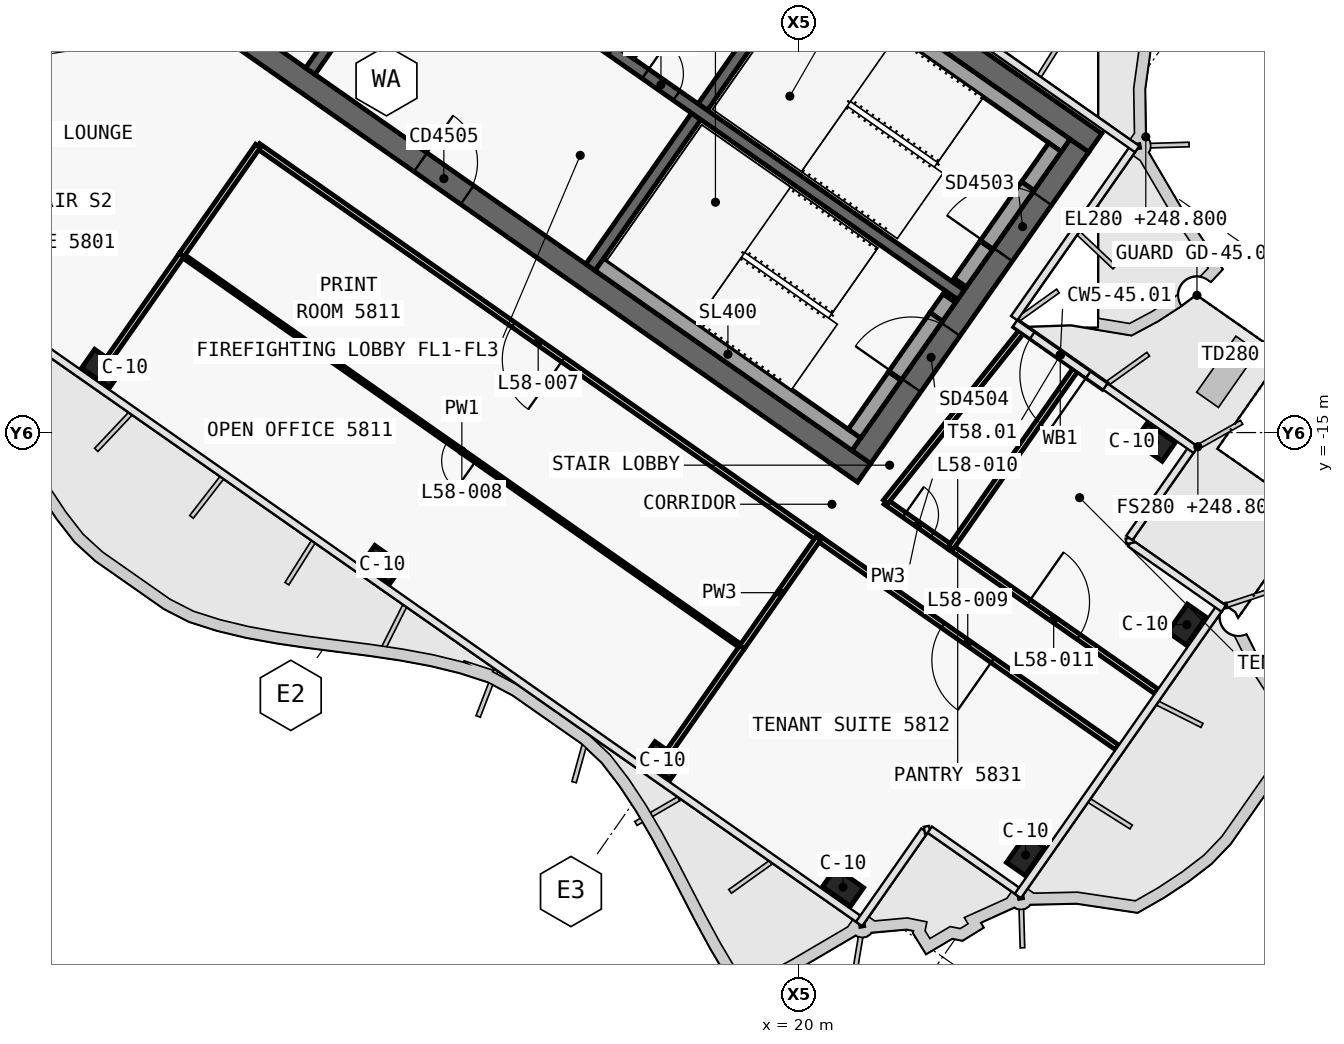
"""IFC4 building model, lengths in metres.
Left out: names, types, materials, properties, quantities, classifications, styles, units other than length and angle.
Written with IfcOpenShell. Run it as: python <this file> out.ifc"""

import sys

from ifc_helpers import new_model, si_unit, direction, frame, frame_2d, origin, origin_2d, place, context, subcontext, project, spatial, polyline, rectangle, outline, extrude, element, fill, save


model = new_model("IFC4")
c1 = context("Model", 3, precision=1e-05, world=origin(), true_north=direction((0.0, 1.0)))
c2 = subcontext(c1, "Body", "Model", "MODEL_VIEW")
j1 = project(units=[si_unit("LENGTHUNIT", "METRE"), si_unit("PLANEANGLEUNIT", "RADIAN")], contexts=[c1])
p1 = place(None, origin())
s1 = spatial("IfcSite", under=j1, at=p1, CompositionType="ELEMENT")
p2 = place(p1, origin())
s2 = spatial("IfcBuilding", under=s1, at=p2, CompositionType="ELEMENT")
p3 = place(p2, frame((0.0, 0.0, 248.8)))
s3 = spatial("IfcBuildingStorey", under=s2, at=p3, CompositionType="ELEMENT", Elevation=248.8)
p4 = place(p3, frame((0.028, 12.066, 0.0), z_axis=(0.0, 0.0, 1.0), x_axis=(0.819151382952, -0.573577380837, 0.0)))
e1 = element("IfcWall", 1, at=p4, inside=s3, PredefinedType="SHEAR", context=c2, shape_type="SweptSolid", body=[
    extrude(outline(polyline([(33.898, 0.3), (0.0, 0.3), (0.42, -0.3), (33.898, -0.3), (33.898, 0.3)])), origin(), (0.0, 0.0, 1.0), 3.9),
])
p5 = place(p3, frame((0.028, -0.874, 0.0), z_axis=(0.0, 0.0, 1.0), x_axis=(0.819150035022, -0.573579305871, 0.0)))
e2 = element("IfcWall", 2, at=p5, inside=s3, PredefinedType="SHEAR", context=c2, shape_type="SweptSolid", body=[
    extrude(outline(polyline([(26.476, 0.3), (0.0, 0.3), (0.42, -0.3), (26.476, -0.3), (26.476, 0.3)])), origin(), (0.0, 0.0, 1.0), 3.9),
])
p6 = place(p5, frame((1.026, 0.0, 0.0)))
e3 = element("IfcOpeningElement", 3, at=p6, cuts=e2, PredefinedType="OPENING", context=c2, shape_type="SweptSolid", body=[
    extrude(rectangle(XDim=1.5, YDim=2.1, at=frame_2d((0.75, 1.05))), frame((0.0, 0.31, 0.0), z_axis=(0.0, -1.0, 0.0), x_axis=(1.0, 0.0, 0.0)), (0.0, 0.0, 1.0), 0.62),
])
p7 = place(p5, frame((12.226, 0.0, 0.0)))
e4 = element("IfcOpeningElement", 4, at=p7, cuts=e2, PredefinedType="OPENING", context=c2, shape_type="SweptSolid", body=[
    extrude(rectangle(XDim=1.5, YDim=2.1, at=frame_2d((0.75, 1.05))), frame((0.0, 0.31, 0.0), z_axis=(0.0, -1.0, 0.0), x_axis=(1.0, 0.0, 0.0)), (0.0, 0.0, 1.0), 0.62),
])
p8 = place(p3, frame((21.642, -15.642, 0.0), z_axis=(0.0, 0.0, 1.0), x_axis=(0.573586866468, 0.819144740944, 0.0)))
e5 = element("IfcWall", 5, at=p8, inside=s3, PredefinedType="SHEAR", context=c2, shape_type="SweptSolid", body=[
    extrude(outline(polyline([(10.0, 0.3), (0.0, 0.3), (0.0, -0.3), (10.0, -0.3), (10.0, 0.3)])), origin(), (0.0, 0.0, 1.0), 3.9),
])
p9 = place(p8, frame((6.5, 0.0, 0.0)))
e6 = element("IfcOpeningElement", 6, at=p9, cuts=e5, PredefinedType="OPENING", context=c2, shape_type="SweptSolid", body=[
    extrude(rectangle(XDim=1.8, YDim=2.1, at=frame_2d((0.9, 1.05))), frame((0.0, 0.31, 0.0), z_axis=(0.0, -1.0, 0.0), x_axis=(1.0, 0.0, 0.0)), (0.0, 0.0, 1.0), 0.62),
])
p10 = place(p8, frame((2.3, 0.0, 0.0)))
e7 = element("IfcOpeningElement", 7, at=p10, cuts=e5, PredefinedType="OPENING", context=c2, shape_type="SweptSolid", body=[
    extrude(rectangle(XDim=1.8, YDim=2.1, at=frame_2d((0.9, 1.05))), frame((0.0, 0.31, 0.0), z_axis=(0.0, -1.0, 0.0), x_axis=(1.0, 0.0, 0.0)), (0.0, 0.0, 1.0), 0.62),
])
p11 = place(p3, frame((7.143, -5.49, 0.0), z_axis=(0.0, 0.0, 1.0), x_axis=(0.573617744349, 0.819123118565, 0.0)))
e8 = element("IfcWall", 8, at=p11, inside=s3, PredefinedType="SHEAR", context=c2, shape_type="SweptSolid", body=[
    extrude(outline(polyline([(0.0, 0.15), (0.0, -0.15), (4.85, -0.15), (4.85, 0.15), (0.0, 0.15)])), origin(), (0.0, 0.0, 1.0), 3.9),
])
p12 = place(p3, frame((14.515, -10.652, 0.0), z_axis=(0.0, 0.0, 1.0), x_axis=(0.573560315113, 0.819163332265, 0.0)))
e9 = element("IfcWall", 9, at=p12, inside=s3, PredefinedType="SHEAR", context=c2, shape_type="SweptSolid", body=[
    extrude(outline(polyline([(0.0, 0.15), (0.0, -0.15), (4.85, -0.15), (4.85, 0.15), (0.0, 0.15)])), origin(), (0.0, 0.0, 1.0), 3.9),
])
p13 = place(p3, frame((17.469, -6.433, 0.0), z_axis=(0.0, 0.0, 1.0), x_axis=(0.573594092424, 0.81913968109, 0.0)))
e10 = element("IfcWall", 10, at=p13, inside=s3, PredefinedType="SHEAR", context=c2, shape_type="SweptSolid", body=[
    extrude(outline(polyline([(4.85, -0.15), (4.85, 0.15), (0.0, 0.15), (0.0, -0.15), (4.85, -0.15)])), origin(), (0.0, 0.0, 1.0), 3.9),
])
p14 = place(p3, frame((2.638, 3.768, 0.0), z_axis=(0.0, 0.0, 1.0), x_axis=(0.819155014212, -0.573572194837, 0.0)))
e11 = element("IfcWall", 11, at=p14, inside=s3, PredefinedType="SHEAR", context=c2, shape_type="SweptSolid", body=[
    extrude(outline(polyline([(0.0, 0.15), (0.0, -0.15), (26.4, -0.15), (26.4, 0.15), (0.0, 0.15)])), origin(), (0.0, 0.0, 1.0), 3.9),
])
p15 = place(p14, frame((9.637, 0.0, 0.0)))
e12 = element("IfcOpeningElement", 12, at=p15, cuts=e11, PredefinedType="OPENING", context=c2, shape_type="SweptSolid", body=[
    extrude(rectangle(XDim=1.2, YDim=2.1, at=frame_2d((0.6, 1.05))), frame((0.0, 0.16, 0.0), z_axis=(0.0, -1.0, 0.0), x_axis=(1.0, 0.0, 0.0)), (0.0, 0.0, 1.0), 0.32),
])
p16 = place(p14, frame((11.812, 0.0, 0.0)))
e13 = element("IfcOpeningElement", 13, at=p16, cuts=e11, PredefinedType="OPENING", context=c2, shape_type="SweptSolid", body=[
    extrude(rectangle(XDim=1.2, YDim=2.1, at=frame_2d((0.6, 1.05))), frame((0.0, 0.16, 0.0), z_axis=(0.0, -1.0, 0.0), x_axis=(1.0, 0.0, 0.0)), (0.0, 0.0, 1.0), 0.32),
])
p17 = place(p14, frame((13.988, 0.0, 0.0)))
e14 = element("IfcOpeningElement", 14, at=p17, cuts=e11, PredefinedType="OPENING", context=c2, shape_type="SweptSolid", body=[
    extrude(rectangle(XDim=1.2, YDim=2.1, at=frame_2d((0.6, 1.05))), frame((0.0, 0.16, 0.0), z_axis=(0.0, -1.0, 0.0), x_axis=(1.0, 0.0, 0.0)), (0.0, 0.0, 1.0), 0.32),
])
p18 = place(p14, frame((16.262, 0.0, 0.0)))
e15 = element("IfcOpeningElement", 15, at=p18, cuts=e11, PredefinedType="OPENING", context=c2, shape_type="SweptSolid", body=[
    extrude(rectangle(XDim=1.0, YDim=2.1, at=frame_2d((0.5, 1.05))), frame((0.0, 0.16, 0.0), z_axis=(0.0, -1.0, 0.0), x_axis=(1.0, 0.0, 0.0)), (0.0, 0.0, 1.0), 0.32),
])
for number, where, z_axis, x_axis in (
    (16, (1.665, -13.313, 0.0), (0.0, 0.0, 1.0), (0.819, -0.574, 0.0)),
    (17, (9.038, -18.475, 0.0), (0.0, 0.0, 1.0), (0.819, -0.574, 0.0)),
    (18, (16.41, -23.637, 0.0), (0.0, 0.0, 1.0), (0.819, -0.574, 0.0)),
    (19, (21.161, -26.964, 0.0), (0.0, 0.0, 1.0), (0.819, -0.574, 0.0)),
    (20, (29.363, -15.25, 0.0), (0.0, 0.0, 1.0), (0.819, -0.574, 0.0)),
    (21, (25.966, -26.117, 0.0), (0.0, 0.0, 1.0), (0.574, 0.819, 0.0)),
    (22, (30.21, -20.055, 0.0), (0.0, 0.0, 1.0), (0.574, 0.819, 0.0)),
):
    element("IfcColumn", number, at=place(p3, frame(where, z_axis=z_axis, x_axis=x_axis)), inside=s3, PredefinedType="COLUMN", context=c2, shape_type="SweptSolid", body=[
        extrude(rectangle(XDim=0.9, YDim=0.6, at=origin_2d()), origin(), (0.0, 0.0, 1.0), 3.9),
    ])
p19 = place(p3, frame((15.565, -5.1, 0.0), z_axis=(0.0, 0.0, 1.0), x_axis=(0.573560315113, 0.819163332265, 0.0)))
e23 = element("IfcWall", 23, at=p19, inside=s3, PredefinedType="SOLIDWALL", context=c2, shape_type="SweptSolid", body=[
    extrude(rectangle(XDim=4.85, YDim=0.2, at=frame_2d((2.425, 0.0))), origin(), (0.0, 0.0, 1.0), 3.9),
])
p20 = place(p3, frame((20.259, -2.71, 0.0), z_axis=(0.0, 0.0, 1.0), x_axis=(0.81914849389, -0.573581506813, 0.0)))
e24 = element("IfcWall", 24, at=p20, inside=s3, PredefinedType="SOLIDWALL", context=c2, shape_type="SweptSolid", body=[
    extrude(rectangle(XDim=8.25, YDim=0.4, at=frame_2d((4.125, 0.0))), origin(), (0.0, 0.0, 1.0), 3.62),
])
p21 = place(p3, frame((24.244, -11.055, 0.0), z_axis=(0.0, 0.0, 1.0), x_axis=(0.573571582932, 0.819155442668, 0.0)))
e25 = element("IfcWall", 25, at=p21, inside=s3, PredefinedType="SOLIDWALL", context=c2, shape_type="SweptSolid", body=[
    extrude(rectangle(XDim=1.2, YDim=0.4, at=frame_2d((0.6, 0.0))), origin(), (0.0, 0.0, 1.0), 3.62),
])
p22 = place(p3, frame((26.022, -8.515, 0.0), z_axis=(0.0, 0.0, 1.0), x_axis=(0.573619628835, 0.819121798889, 0.0)))
e26 = element("IfcWall", 26, at=p22, inside=s3, PredefinedType="SOLIDWALL", context=c2, shape_type="SweptSolid", body=[
    extrude(rectangle(XDim=1.25, YDim=0.4, at=frame_2d((0.625, 0.0))), origin(), (0.0, 0.0, 1.0), 3.62),
])
p23 = place(p3, frame((24.932, -10.072, 2.15), z_axis=(0.0, 0.0, 1.0), x_axis=(0.573591692345, 0.819141361715, 0.0)))
e27 = element("IfcWall", 27, at=p23, inside=s3, PredefinedType="SOLIDWALL", context=c2, shape_type="SweptSolid", body=[
    extrude(rectangle(XDim=1.9, YDim=0.4, at=frame_2d((0.95, 0.0))), origin(), (0.0, 0.0, 1.0), 1.47),
])
p24 = place(p3, frame((14.753, -10.574, 0.0), z_axis=(0.0, 0.0, 1.0), x_axis=(0.819158229677, -0.573567602601, 0.0)))
e28 = element("IfcWall", 28, at=p24, inside=s3, PredefinedType="SOLIDWALL", context=c2, shape_type="SweptSolid", body=[
    extrude(rectangle(XDim=8.25, YDim=0.4, at=frame_2d((4.125, 0.0))), origin(), (0.0, 0.0, 1.0), 3.62),
])
p25 = place(p3, frame((21.462, -15.028, 0.0), z_axis=(0.0, 0.0, 1.0), x_axis=(0.573559770908, 0.819163713305, 0.0)))
e29 = element("IfcWall", 29, at=p25, inside=s3, PredefinedType="SOLIDWALL", context=c2, shape_type="SweptSolid", body=[
    extrude(rectangle(XDim=1.85, YDim=0.4, at=frame_2d((0.925, 0.0))), origin(), (0.0, 0.0, 1.0), 3.62),
])
p26 = place(p3, frame((23.613, -11.956, 0.0), z_axis=(0.0, 0.0, 1.0), x_axis=(0.573435029941, 0.819251039936, 0.0)))
e30 = element("IfcWall", 30, at=p26, inside=s3, PredefinedType="SOLIDWALL", context=c2, shape_type="SweptSolid", body=[
    extrude(rectangle(XDim=0.6, YDim=0.4, at=frame_2d((0.3, 0.0))), origin(), (0.0, 0.0, 1.0), 3.62),
])
p27 = place(p3, frame((22.523, -13.512, 2.15), z_axis=(0.0, 0.0, 1.0), x_axis=(0.573591692345, 0.819141361715, 0.0)))
e31 = element("IfcWall", 31, at=p27, inside=s3, PredefinedType="SOLIDWALL", context=c2, shape_type="SweptSolid", body=[
    extrude(rectangle(XDim=1.9, YDim=0.4, at=frame_2d((0.95, 0.0))), origin(), (0.0, 0.0, 1.0), 1.47),
])
p28 = place(p3, frame((28.04, -13.774, 0.0), z_axis=(0.0, 0.0, 1.0), x_axis=(-0.819134974682, 0.573600813505, 0.0)))
e32 = element("IfcWall", 32, at=p28, inside=s3, PredefinedType="SOLIDWALL", context=c2, shape_type="SweptSolid", body=[
    extrude(rectangle(XDim=2.84, YDim=0.2, at=frame_2d((1.42, 0.0))), origin(), (0.0, 0.0, 1.0), 3.62),
])
p29 = place(p28, frame((0.52, 0.0, 0.0)))
e33 = element("IfcOpeningElement", 33, at=p29, cuts=e32, PredefinedType="OPENING", context=c2, shape_type="SweptSolid", body=[
    extrude(rectangle(XDim=1.8, YDim=2.4, at=frame_2d((0.9, 1.2))), frame((0.0, 0.11, 0.0), z_axis=(0.0, -1.0, 0.0), x_axis=(1.0, 0.0, 0.0)), (0.0, 0.0, 1.0), 0.22),
])
p30 = place(p3, frame((22.281, -16.822, 0.0), z_axis=(0.0, 0.0, 1.0), x_axis=(0.819166447083, -0.573555866479, 0.0)))
e34 = element("IfcWall", 34, at=p30, inside=s3, PredefinedType="PARTITIONING", context=c2, shape_type="SweptSolid", body=[
    extrude(rectangle(XDim=2.102, YDim=0.15, at=frame_2d((1.051, 0.0))), origin(), (0.0, 0.0, 1.0), 3.62),
])
p31 = place(p30, frame((0.601, 0.0, 0.0)))
e35 = element("IfcOpeningElement", 35, at=p31, cuts=e34, PredefinedType="OPENING", context=c2, shape_type="SweptSolid", body=[
    extrude(rectangle(XDim=0.9, YDim=2.1, at=frame_2d((0.45, 1.05))), frame((0.0, 0.085, 0.0), z_axis=(0.0, -1.0, 0.0), x_axis=(1.0, 0.0, 0.0)), (0.0, 0.0, 1.0), 0.17),
])
p32 = place(p3, frame((23.999, -18.025, 0.0), z_axis=(0.0, 0.0, 1.0), x_axis=(0.819169373176, -0.57355168734, 0.0)))
e36 = element("IfcWall", 36, at=p32, inside=s3, PredefinedType="PARTITIONING", context=c2, shape_type="SweptSolid", body=[
    extrude(rectangle(XDim=6.602, YDim=0.15, at=frame_2d((3.301, 0.0))), origin(), (0.0, 0.0, 1.0), 3.0),
])
p33 = place(p32, frame((2.501, 0.0, 0.0)))
e37 = element("IfcOpeningElement", 37, at=p33, cuts=e36, PredefinedType="OPENING", context=c2, shape_type="SweptSolid", body=[
    extrude(rectangle(XDim=1.6, YDim=2.1, at=frame_2d((0.8, 1.05))), frame((0.0, 0.085, 0.0), z_axis=(0.0, -1.0, 0.0), x_axis=(1.0, 0.0, 0.0)), (0.0, 0.0, 1.0), 0.17),
])
p34 = place(p3, frame((20.513, -17.781, 0.0), z_axis=(0.0, 0.0, 1.0), x_axis=(-0.819153544995, 0.573574293115, 0.0)))
e38 = element("IfcWall", 38, at=p34, inside=s3, PredefinedType="PARTITIONING", context=c2, shape_type="SweptSolid", body=[
    extrude(rectangle(XDim=18.002, YDim=0.15, at=frame_2d((9.001, 0.0))), origin(), (0.0, 0.0, 1.0), 3.05),
])
p35 = place(p34, frame((8.201, 0.0, 0.0)))
e39 = element("IfcOpeningElement", 39, at=p35, cuts=e38, PredefinedType="OPENING", context=c2, shape_type="SweptSolid", body=[
    extrude(rectangle(XDim=1.6, YDim=2.1, at=frame_2d((0.8, 1.05))), frame((0.0, 0.085, 0.0), z_axis=(0.0, -1.0, 0.0), x_axis=(1.0, 0.0, 0.0)), (0.0, 0.0, 1.0), 0.17),
])
p36 = place(p3, frame((28.375, -23.287, 0.0), z_axis=(0.0, 0.0, 1.0), x_axis=(-0.819147101588, 0.573583495196, 0.0)))
e40 = element("IfcWall", 40, at=p36, inside=s3, PredefinedType="PARTITIONING", context=c2, shape_type="SweptSolid", body=[
    extrude(rectangle(XDim=9.602, YDim=0.15, at=frame_2d((4.801, 0.0))), origin(), (0.0, 0.0, 1.0), 3.0),
])
p37 = place(p36, frame((4.001, 0.0, 0.0)))
e41 = element("IfcOpeningElement", 41, at=p37, cuts=e40, PredefinedType="OPENING", context=c2, shape_type="SweptSolid", body=[
    extrude(rectangle(XDim=1.6, YDim=2.1, at=frame_2d((0.8, 1.05))), frame((0.0, 0.085, 0.0), z_axis=(0.0, -1.0, 0.0), x_axis=(1.0, 0.0, 0.0)), (0.0, 0.0, 1.0), 0.17),
])
p38 = place(p3, frame((27.269, -13.356, 0.0), z_axis=(0.0, 0.0, 1.0), x_axis=(-0.573309978038, -0.819338555838, 0.0)))
e42 = element("IfcWall", 42, at=p38, inside=s3, PredefinedType="PARTITIONING", context=c2, shape_type="SweptSolid", body=[
    extrude(rectangle(XDim=5.7, YDim=0.15, at=frame_2d((2.85, 0.0))), origin(), (0.0, 0.0, 1.0), 3.05),
])
p39 = place(p3, frame((22.282, -16.823, 0.0), z_axis=(0.0, 0.0, 1.0), x_axis=(0.623563137477, 0.781772993637, 0.0)))
e43 = element("IfcWall", 43, at=p39, inside=s3, PredefinedType="PARTITIONING", context=c2, shape_type="SweptSolid", body=[
    extrude(rectangle(XDim=5.711, YDim=0.15, at=frame_2d((2.855, 0.0))), origin(), (0.0, 0.0, 1.0), 3.05),
])
p40 = place(p3, frame((18.503, -20.648, 0.0), z_axis=(0.0, 0.0, 1.0), x_axis=(-0.819154173185, 0.573573395961, 0.0)))
e44 = element("IfcWall", 44, at=p40, inside=s3, PredefinedType="PARTITIONING", context=c2, shape_type="SweptSolid", body=[
    extrude(rectangle(XDim=18.0, YDim=0.1, at=frame_2d((9.0, 0.0))), origin(), (0.0, 0.0, 1.0), 3.05),
])
p41 = place(p40, frame((8.55, 0.0, 0.0)))
e45 = element("IfcOpeningElement", 45, at=p41, cuts=e44, PredefinedType="OPENING", context=c2, shape_type="SweptSolid", body=[
    extrude(rectangle(XDim=0.9, YDim=2.1, at=frame_2d((0.45, 1.05))), frame((0.0, 0.06, 0.0), z_axis=(0.0, -1.0, 0.0), x_axis=(1.0, 0.0, 0.0)), (0.0, 0.0, 1.0), 0.12),
])
p42 = place(p3, frame((18.503, -20.648, 0.0), z_axis=(0.0, 0.0, 1.0), x_axis=(-0.573560777794, -0.819163008306, 0.0)))
e46 = element("IfcWall", 46, at=p42, inside=s3, PredefinedType="PARTITIONING", context=c2, shape_type="SweptSolid", body=[
    extrude(rectangle(XDim=3.329, YDim=0.15, at=frame_2d((1.665, 0.0))), origin(), (0.0, 0.0, 1.0), 3.05),
])
p43 = place(p3, frame((1.849, -13.051, 0.0), z_axis=(0.0, 0.0, 1.0), x_axis=(0.573595235521, 0.819138880647, 0.0)))
e47 = element("IfcWall", 47, at=p43, inside=s3, PredefinedType="PARTITIONING", context=c2, shape_type="SweptSolid", body=[
    extrude(rectangle(XDim=3.329, YDim=0.15, at=frame_2d((1.665, 0.0))), origin(), (0.0, 0.0, 1.0), 3.05),
])
p44 = place(p3, frame((20.511, -17.78, 0.0), z_axis=(0.0, 0.0, 1.0), x_axis=(-0.573551294295, -0.819169648371, 0.0)))
e48 = element("IfcWall", 48, at=p44, inside=s3, PredefinedType="PARTITIONING", context=c2, shape_type="SweptSolid", body=[
    extrude(rectangle(XDim=3.5, YDim=0.15, at=frame_2d((1.75, 0.0))), origin(), (0.0, 0.0, 1.0), 3.05),
])
p45 = place(p3, frame((3.759, -10.323, 0.0), z_axis=(0.0, 0.0, 1.0), x_axis=(0.573598101901, 0.81913687348, 0.0)))
e49 = element("IfcWall", 49, at=p45, inside=s3, PredefinedType="PARTITIONING", context=c2, shape_type="SweptSolid", body=[
    extrude(rectangle(XDim=3.5, YDim=0.15, at=frame_2d((1.75, 0.0))), origin(), (0.0, 0.0, 1.0), 3.05),
])
p46 = place(p18, origin())
e50 = element("IfcDoor", 50, at=p46, inside=s3, OperationType="SINGLE_SWING_RIGHT", PredefinedType="DOOR", context=c2, shape_type="SweptSolid", body=[
    extrude(rectangle(XDim=1.0, YDim=2.1, at=frame_2d((0.5, 1.05))), frame((0.0, 0.025, 0.0), z_axis=(0.0, -1.0, 0.0), x_axis=(1.0, 0.0, 0.0)), (0.0, 0.0, 1.0), 0.05),
])
fill(e15, e50)
p47 = place(p7, origin())
e51 = element("IfcDoor", 51, at=p47, inside=s3, OperationType="DOUBLE_DOOR_SINGLE_SWING", PredefinedType="DOOR", context=c2, shape_type="SweptSolid", body=[
    extrude(rectangle(XDim=1.5, YDim=2.1, at=frame_2d((0.75, 1.05))), frame((0.0, 0.025, 0.0), z_axis=(0.0, -1.0, 0.0), x_axis=(1.0, 0.0, 0.0)), (0.0, 0.0, 1.0), 0.05),
])
fill(e4, e51)
p48 = place(p9, origin())
e52 = element("IfcDoor", 52, at=p48, inside=s3, OperationType="DOUBLE_DOOR_SINGLE_SWING", PredefinedType="DOOR", context=c2, shape_type="SweptSolid", body=[
    extrude(rectangle(XDim=1.8, YDim=2.1, at=frame_2d((0.9, 1.05))), frame((0.0, 0.025, 0.0), z_axis=(0.0, -1.0, 0.0), x_axis=(1.0, 0.0, 0.0)), (0.0, 0.0, 1.0), 0.05),
])
fill(e6, e52)
p49 = place(p10, origin())
e53 = element("IfcDoor", 53, at=p49, inside=s3, OperationType="DOUBLE_DOOR_SINGLE_SWING", PredefinedType="DOOR", context=c2, shape_type="SweptSolid", body=[
    extrude(rectangle(XDim=1.8, YDim=2.1, at=frame_2d((0.9, 1.05))), frame((0.0, 0.025, 0.0), z_axis=(0.0, -1.0, 0.0), x_axis=(1.0, 0.0, 0.0)), (0.0, 0.0, 1.0), 0.05),
])
fill(e7, e53)
p50 = place(p29, origin())
e54 = element("IfcDoor", 54, at=p50, inside=s3, OperationType="DOUBLE_DOOR_DOUBLE_SWING", PredefinedType="DOOR", context=c2, shape_type="SweptSolid", body=[
    extrude(rectangle(XDim=1.8, YDim=2.4, at=frame_2d((0.9, 1.2))), frame((0.0, 0.025, 0.0), z_axis=(0.0, -1.0, 0.0), x_axis=(1.0, 0.0, 0.0)), (0.0, 0.0, 1.0), 0.05),
])
fill(e33, e54)
p51 = place(p35, origin())
e55 = element("IfcDoor", 55, at=p51, inside=s3, OperationType="DOUBLE_DOOR_SINGLE_SWING", PredefinedType="DOOR", context=c2, shape_type="SweptSolid", body=[
    extrude(rectangle(XDim=1.6, YDim=2.1, at=frame_2d((0.8, 1.05))), frame((0.0, 0.025, 0.0), z_axis=(0.0, -1.0, 0.0), x_axis=(1.0, 0.0, 0.0)), (0.0, 0.0, 1.0), 0.05),
])
fill(e39, e55)
p52 = place(p41, origin())
e56 = element("IfcDoor", 56, at=p52, inside=s3, OperationType="SINGLE_SWING_RIGHT", PredefinedType="DOOR", context=c2, shape_type="SweptSolid", body=[
    extrude(rectangle(XDim=0.9, YDim=2.1, at=frame_2d((0.45, 1.05))), frame((0.0, 0.025, 0.0), z_axis=(0.0, -1.0, 0.0), x_axis=(1.0, 0.0, 0.0)), (0.0, 0.0, 1.0), 0.05),
])
fill(e45, e56)
p53 = place(p37, origin())
e57 = element("IfcDoor", 57, at=p53, inside=s3, OperationType="DOUBLE_DOOR_SINGLE_SWING", PredefinedType="DOOR", context=c2, shape_type="SweptSolid", body=[
    extrude(rectangle(XDim=1.6, YDim=2.1, at=frame_2d((0.8, 1.05))), frame((0.0, 0.025, 0.0), z_axis=(0.0, -1.0, 0.0), x_axis=(1.0, 0.0, 0.0)), (0.0, 0.0, 1.0), 0.05),
])
fill(e41, e57)
p54 = place(p31, origin())
e58 = element("IfcDoor", 58, at=p54, inside=s3, OperationType="SINGLE_SWING_LEFT", PredefinedType="DOOR", context=c2, shape_type="SweptSolid", body=[
    extrude(rectangle(XDim=0.9, YDim=2.1, at=frame_2d((0.45, 1.05))), frame((0.0, 0.025, 0.0), z_axis=(0.0, -1.0, 0.0), x_axis=(1.0, 0.0, 0.0)), (0.0, 0.0, 1.0), 0.05),
])
fill(e35, e58)
p55 = place(p33, origin())
e59 = element("IfcDoor", 59, at=p55, inside=s3, OperationType="DOUBLE_DOOR_SINGLE_SWING", PredefinedType="DOOR", context=c2, shape_type="SweptSolid", body=[
    extrude(rectangle(XDim=1.6, YDim=2.1, at=frame_2d((0.8, 1.05))), frame((0.0, 0.025, 0.0), z_axis=(0.0, -1.0, 0.0), x_axis=(1.0, 0.0, 0.0)), (0.0, 0.0, 1.0), 0.05),
])
fill(e37, e59)
save(model, sys.argv[1])
